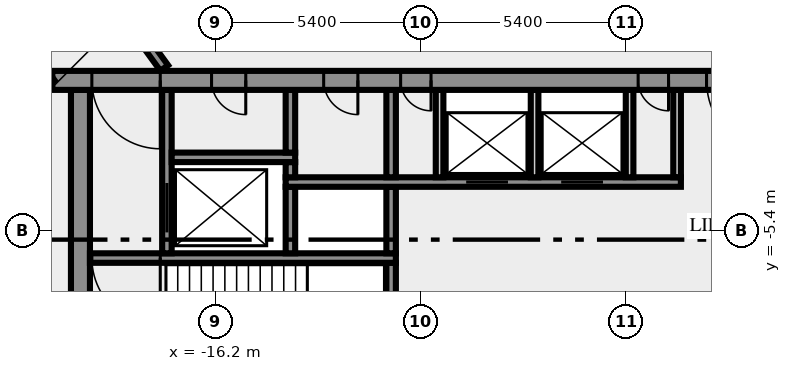
"""IFC4 building model, lengths in metres.
Left out: names, types, materials, properties, quantities, classifications, styles, units other than length and angle.
Written with IfcOpenShell. Run it as: python <this file> out.ifc"""

import sys

from ifc_helpers import new_model, si_unit, direction, frame, frame_2d, origin, place, context, subcontext, project, spatial, rectangle, extrude, element, fill, save


model = new_model("IFC4")
c1 = context("Model", 3, precision=1e-05, world=origin(), true_north=direction((0.0, 1.0)))
c2 = subcontext(c1, "Body", "Model", "MODEL_VIEW")
j1 = project(units=[si_unit("LENGTHUNIT", "METRE"), si_unit("PLANEANGLEUNIT", "RADIAN")], contexts=[c1])
p1 = place(None, origin())
s1 = spatial("IfcSite", under=j1, at=p1, CompositionType="ELEMENT")
p2 = place(p1, origin())
s2 = spatial("IfcBuilding", under=s1, at=p2, CompositionType="ELEMENT")
p3 = place(p2, frame((0.0, 0.0, 327.0)))
s3 = spatial("IfcBuildingStorey", under=s2, at=p3, CompositionType="ELEMENT", Elevation=327.0)
p4 = place(p3, frame((-19.75, -10.5, 0.0), z_axis=(0.0, 0.0, 1.0), x_axis=(0.0, 1.0, 0.0)))
e1 = element("IfcWall", 1, at=p4, inside=s3, PredefinedType="SHEAR", context=c2, shape_type="SweptSolid", body=[
    extrude(rectangle(XDim=8.8, YDim=0.5, at=frame_2d((4.4, 0.0))), origin(), (0.0, 0.0, 1.0), 3.65),
])
p5 = place(p3, frame((-11.575, -7.25, 0.0), z_axis=(0.0, 0.0, 1.0), x_axis=(0.0, 1.0, 0.0)))
e2 = element("IfcWall", 2, at=p5, inside=s3, PredefinedType="SHEAR", context=c2, shape_type="SweptSolid", body=[
    extrude(rectangle(XDim=1.0, YDim=0.25, at=frame_2d((0.5, 0.0))), origin(), (0.0, 0.0, 1.0), 3.65),
])
p6 = place(p3, frame((-11.45, -6.125, 0.0), z_axis=(0.0, 0.0, 1.0), x_axis=(-1.0, 0.0, 0.0)))
e3 = element("IfcWall", 3, at=p6, inside=s3, PredefinedType="SHEAR", context=c2, shape_type="SweptSolid", body=[
    extrude(rectangle(XDim=8.05, YDim=0.25, at=frame_2d((4.025, 0.0))), origin(), (0.0, 0.0, 1.0), 3.65),
])
p7 = place(p6, frame((6.2, 0.0, 0.0)))
e4 = element("IfcOpeningElement", 4, at=p7, cuts=e3, PredefinedType="OPENING", context=c2, shape_type="SweptSolid", body=[
    extrude(rectangle(XDim=1.8, YDim=2.1, at=frame_2d((0.9, 1.05))), frame((0.0, 0.135, 0.0), z_axis=(0.0, -1.0, 0.0), x_axis=(1.0, 0.0, 0.0)), (0.0, 0.0, 1.0), 0.27),
])
p8 = place(p3, frame((-17.475, -6.0, 0.0), z_axis=(0.0, 0.0, 1.0), x_axis=(0.0, 1.0, 0.0)))
e5 = element("IfcWall", 5, at=p8, inside=s3, PredefinedType="SHEAR", context=c2, shape_type="SweptSolid", body=[
    extrude(rectangle(XDim=4.3, YDim=0.25, at=frame_2d((2.15, 0.0))), origin(), (0.0, 0.0, 1.0), 3.65),
])
p9 = place(p8, frame((0.55, 0.0, 0.0)))
e6 = element("IfcOpeningElement", 6, at=p9, cuts=e5, PredefinedType="OPENING", context=c2, shape_type="SweptSolid", body=[
    extrude(rectangle(XDim=1.3, YDim=2.1, at=frame_2d((0.65, 1.05))), frame((0.0, 0.135, 0.0), z_axis=(0.0, -1.0, 0.0), x_axis=(1.0, 0.0, 0.0)), (0.0, 0.0, 1.0), 0.27),
])
for number, where, z_axis, x_axis in (
    (7, (-14.225, -6.0, 0.0), (0.0, 0.0, 1.0), (0.0, 1.0, 0.0)),
    (8, (-11.575, -6.0, 0.0), (0.0, 0.0, 1.0), (0.0, 1.0, 0.0)),
):
    element("IfcWall", number, at=place(p3, frame(where, z_axis=z_axis, x_axis=x_axis)), inside=s3, PredefinedType="SHEAR", context=c2, shape_type="SweptSolid", body=[
        extrude(rectangle(XDim=1.75, YDim=0.25, at=frame_2d((0.875, 0.0))), origin(), (0.0, 0.0, 1.0), 3.65),
    ])
p10 = place(p3, frame((-14.35, -4.125, 0.0), z_axis=(0.0, 0.0, 1.0), x_axis=(1.0, 0.0, 0.0)))
e9 = element("IfcWall", 9, at=p10, inside=s3, PredefinedType="SHEAR", context=c2, shape_type="SweptSolid", body=[
    extrude(rectangle(XDim=10.4, YDim=0.25, at=frame_2d((5.2, 0.0))), origin(), (0.0, 0.0, 1.0), 3.65),
])
p11 = place(p10, frame((4.75, 0.0, 0.0)))
e10 = element("IfcOpeningElement", 10, at=p11, cuts=e9, PredefinedType="OPENING", context=c2, shape_type="SweptSolid", body=[
    extrude(rectangle(XDim=1.1, YDim=2.1, at=frame_2d((0.55, 1.05))), frame((0.0, 0.135, 0.0), z_axis=(0.0, -1.0, 0.0), x_axis=(1.0, 0.0, 0.0)), (0.0, 0.0, 1.0), 0.27),
])
p12 = place(p10, frame((7.25, 0.0, 0.0)))
e11 = element("IfcOpeningElement", 11, at=p12, cuts=e9, PredefinedType="OPENING", context=c2, shape_type="SweptSolid", body=[
    extrude(rectangle(XDim=1.1, YDim=2.1, at=frame_2d((0.55, 1.05))), frame((0.0, 0.135, 0.0), z_axis=(0.0, -1.0, 0.0), x_axis=(1.0, 0.0, 0.0)), (0.0, 0.0, 1.0), 0.27),
])
p13 = place(p3, frame((-14.225, -4.0, 0.0), z_axis=(0.0, 0.0, 1.0), x_axis=(0.0, 1.0, 0.0)))
e12 = element("IfcWall", 12, at=p13, inside=s3, PredefinedType="SHEAR", context=c2, shape_type="SweptSolid", body=[
    extrude(rectangle(XDim=0.4, YDim=0.25, at=frame_2d((0.2, 0.0))), origin(), (0.0, 0.0, 1.0), 3.65),
])
p14 = place(p3, frame((-11.575, -4.0, 0.0), z_axis=(0.0, 0.0, 1.0), x_axis=(0.0, 1.0, 0.0)))
e13 = element("IfcWall", 13, at=p14, inside=s3, PredefinedType="SHEAR", context=c2, shape_type="SweptSolid", body=[
    extrude(rectangle(XDim=2.3, YDim=0.25, at=frame_2d((1.15, 0.0))), origin(), (0.0, 0.0, 1.0), 3.65),
])
for number, where, z_axis, x_axis in (
    (14, (-10.3, -4.0, 0.0), (0.0, 0.0, 1.0), (0.0, 1.0, 0.0)),
    (15, (-7.8, -4.0, 0.0), (0.0, 0.0, 1.0), (0.0, 1.0, 0.0)),
    (16, (-5.3, -4.0, 0.0), (0.0, 0.0, 1.0), (0.0, 1.0, 0.0)),
    (17, (-4.05, -4.0, 0.0), (0.0, 0.0, 1.0), (0.0, 1.0, 0.0)),
):
    element("IfcWall", number, at=place(p3, frame(where, z_axis=z_axis, x_axis=x_axis)), inside=s3, PredefinedType="SOLIDWALL", context=c2, shape_type="SweptSolid", body=[
        extrude(rectangle(XDim=2.3, YDim=0.2, at=frame_2d((1.15, 0.0))), origin(), (0.0, 0.0, 1.0), 3.65),
    ])
p15 = place(p3, frame((-17.35, -3.475, 0.0), z_axis=(0.0, 0.0, 1.0), x_axis=(1.0, 0.0, 0.0)))
e18 = element("IfcWall", 18, at=p15, inside=s3, PredefinedType="SHEAR", context=c2, shape_type="SweptSolid", body=[
    extrude(rectangle(XDim=3.25, YDim=0.25, at=frame_2d((1.625, 0.0))), origin(), (0.0, 0.0, 1.0), 3.65),
])
p16 = place(p3, frame((-14.225, -3.35, 0.0), z_axis=(0.0, 0.0, 1.0), x_axis=(0.0, 1.0, 0.0)))
e19 = element("IfcWall", 19, at=p16, inside=s3, PredefinedType="SHEAR", context=c2, shape_type="SweptSolid", body=[
    extrude(rectangle(XDim=1.65, YDim=0.25, at=frame_2d((0.825, 0.0))), origin(), (0.0, 0.0, 1.0), 3.65),
])
p17 = place(p3, frame((20.49, -1.45, 0.0), z_axis=(0.0, 0.0, 1.0), x_axis=(-1.0, 0.0, 0.0)))
e20 = element("IfcWall", 20, at=p17, inside=s3, PredefinedType="SHEAR", context=c2, shape_type="SweptSolid", body=[
    extrude(rectangle(XDim=40.98, YDim=0.5, at=frame_2d((20.49, 0.0))), origin(), (0.0, 0.0, 1.0), 3.65),
])
p18 = place(p17, frame((38.14, 0.0, 0.0)))
e21 = element("IfcOpeningElement", 21, at=p18, cuts=e20, PredefinedType="OPENING", context=c2, shape_type="SweptSolid", body=[
    extrude(rectangle(XDim=1.8, YDim=2.1, at=frame_2d((0.9, 1.05))), frame((0.0, 0.26, 0.0), z_axis=(0.0, -1.0, 0.0), x_axis=(1.0, 0.0, 0.0)), (0.0, 0.0, 1.0), 0.52),
])
p19 = place(p17, frame((35.89, 0.0, 0.0)))
e22 = element("IfcOpeningElement", 22, at=p19, cuts=e20, PredefinedType="OPENING", context=c2, shape_type="SweptSolid", body=[
    extrude(rectangle(XDim=0.9, YDim=2.1, at=frame_2d((0.45, 1.05))), frame((0.0, 0.26, 0.0), z_axis=(0.0, -1.0, 0.0), x_axis=(1.0, 0.0, 0.0)), (0.0, 0.0, 1.0), 0.52),
])
p20 = place(p17, frame((32.94, 0.0, 0.0)))
e23 = element("IfcOpeningElement", 23, at=p20, cuts=e20, PredefinedType="OPENING", context=c2, shape_type="SweptSolid", body=[
    extrude(rectangle(XDim=0.9, YDim=2.1, at=frame_2d((0.45, 1.05))), frame((0.0, 0.26, 0.0), z_axis=(0.0, -1.0, 0.0), x_axis=(1.0, 0.0, 0.0)), (0.0, 0.0, 1.0), 0.52),
])
p21 = place(p17, frame((31.015, 0.0, 0.0)))
e24 = element("IfcOpeningElement", 24, at=p21, cuts=e20, PredefinedType="OPENING", context=c2, shape_type="SweptSolid", body=[
    extrude(rectangle(XDim=0.8, YDim=2.1, at=frame_2d((0.4, 1.05))), frame((0.0, 0.26, 0.0), z_axis=(0.0, -1.0, 0.0), x_axis=(1.0, 0.0, 0.0)), (0.0, 0.0, 1.0), 0.52),
])
p22 = place(p17, frame((24.765, 0.0, 0.0)))
e25 = element("IfcOpeningElement", 25, at=p22, cuts=e20, PredefinedType="OPENING", context=c2, shape_type="SweptSolid", body=[
    extrude(rectangle(XDim=0.8, YDim=2.1, at=frame_2d((0.4, 1.05))), frame((0.0, 0.26, 0.0), z_axis=(0.0, -1.0, 0.0), x_axis=(1.0, 0.0, 0.0)), (0.0, 0.0, 1.0), 0.52),
])
p23 = place(p17, frame((21.765, 0.0, 0.0)))
e26 = element("IfcOpeningElement", 26, at=p23, cuts=e20, PredefinedType="OPENING", context=c2, shape_type="SweptSolid", body=[
    extrude(rectangle(XDim=2.0, YDim=2.1, at=frame_2d((1.0, 1.05))), frame((0.0, 0.26, 0.0), z_axis=(0.0, -1.0, 0.0), x_axis=(1.0, 0.0, 0.0)), (0.0, 0.0, 1.0), 0.52),
])
p24 = place(p17, frame((15.103, 0.0, 0.0)))
e27 = element("IfcOpeningElement", 27, at=p24, cuts=e20, PredefinedType="OPENING", context=c2, shape_type="SweptSolid", body=[
    extrude(rectangle(XDim=0.9, YDim=2.1, at=frame_2d((0.45, 1.05))), frame((0.0, 0.26, 0.0), z_axis=(0.0, -1.0, 0.0), x_axis=(1.0, 0.0, 0.0)), (0.0, 0.0, 1.0), 0.52),
])
p25 = place(p17, frame((13.04, 0.0, 0.0)))
e28 = element("IfcOpeningElement", 28, at=p25, cuts=e20, PredefinedType="OPENING", context=c2, shape_type="SweptSolid", body=[
    extrude(rectangle(XDim=0.9, YDim=2.1, at=frame_2d((0.45, 1.05))), frame((0.0, 0.26, 0.0), z_axis=(0.0, -1.0, 0.0), x_axis=(1.0, 0.0, 0.0)), (0.0, 0.0, 1.0), 0.52),
])
p26 = place(p17, frame((10.177, 0.0, 0.0)))
e29 = element("IfcOpeningElement", 29, at=p26, cuts=e20, PredefinedType="OPENING", context=c2, shape_type="SweptSolid", body=[
    extrude(rectangle(XDim=0.9, YDim=2.1, at=frame_2d((0.45, 1.05))), frame((0.0, 0.26, 0.0), z_axis=(0.0, -1.0, 0.0), x_axis=(1.0, 0.0, 0.0)), (0.0, 0.0, 1.0), 0.52),
])
p27 = place(p17, frame((7.14, 0.0, 0.0)))
e30 = element("IfcOpeningElement", 30, at=p27, cuts=e20, PredefinedType="OPENING", context=c2, shape_type="SweptSolid", body=[
    extrude(rectangle(XDim=0.9, YDim=2.1, at=frame_2d((0.45, 1.05))), frame((0.0, 0.26, 0.0), z_axis=(0.0, -1.0, 0.0), x_axis=(1.0, 0.0, 0.0)), (0.0, 0.0, 1.0), 0.52),
])
p28 = place(p17, frame((5.028, 0.0, 0.0)))
e31 = element("IfcOpeningElement", 31, at=p28, cuts=e20, PredefinedType="OPENING", context=c2, shape_type="SweptSolid", body=[
    extrude(rectangle(XDim=0.8, YDim=2.1, at=frame_2d((0.4, 1.05))), frame((0.0, 0.26, 0.0), z_axis=(0.0, -1.0, 0.0), x_axis=(1.0, 0.0, 0.0)), (0.0, 0.0, 1.0), 0.52),
])
p29 = place(p17, frame((3.452, 0.0, 0.0)))
e32 = element("IfcOpeningElement", 32, at=p29, cuts=e20, PredefinedType="OPENING", context=c2, shape_type="SweptSolid", body=[
    extrude(rectangle(XDim=0.8, YDim=2.1, at=frame_2d((0.4, 1.05))), frame((0.0, 0.26, 0.0), z_axis=(0.0, -1.0, 0.0), x_axis=(1.0, 0.0, 0.0)), (0.0, 0.0, 1.0), 0.52),
])
p30 = place(p17, frame((1.04, 0.0, 0.0)))
e33 = element("IfcOpeningElement", 33, at=p30, cuts=e20, PredefinedType="OPENING", context=c2, shape_type="SweptSolid", body=[
    extrude(rectangle(XDim=1.8, YDim=2.1, at=frame_2d((0.9, 1.05))), frame((0.0, 0.26, 0.0), z_axis=(0.0, -1.0, 0.0), x_axis=(1.0, 0.0, 0.0)), (0.0, 0.0, 1.0), 0.52),
])
p31 = place(p3, frame((-20.531, -1.523, 0.0), z_axis=(0.0, 0.0, 1.0), x_axis=(-0.587782646447, 0.809018887626, 0.0)))
e34 = element("IfcWall", 34, at=p31, inside=s3, PredefinedType="SOLIDWALL", context=c2, shape_type="SweptSolid", body=[
    extrude(rectangle(XDim=11.27, YDim=0.25, at=frame_2d((5.635, 0.0))), origin(), (0.0, 0.0, 1.0), 3.65),
])
p32 = place(p31, frame((7.566, 0.0, 0.0)))
e35 = element("IfcOpeningElement", 35, at=p32, cuts=e34, PredefinedType="OPENING", context=c2, shape_type="SweptSolid", body=[
    extrude(rectangle(XDim=0.9, YDim=2.1, at=frame_2d((0.45, 1.05))), frame((0.0, 0.135, 0.0), z_axis=(0.0, -1.0, 0.0), x_axis=(1.0, 0.0, 0.0)), (0.0, 0.0, 1.0), 0.27),
])
p33 = place(p31, frame((9.165, 0.0, 0.0)))
e36 = element("IfcOpeningElement", 36, at=p33, cuts=e34, PredefinedType="OPENING", context=c2, shape_type="SweptSolid", body=[
    extrude(rectangle(XDim=0.9, YDim=2.1, at=frame_2d((0.45, 1.05))), frame((0.0, 0.135, 0.0), z_axis=(0.0, -1.0, 0.0), x_axis=(1.0, 0.0, 0.0)), (0.0, 0.0, 1.0), 0.27),
])
p34 = place(p3, frame((-24.865, 8.95, 0.0), z_axis=(0.0, 0.0, 1.0), x_axis=(0.587791617212, -0.809012369952, 0.0)))
e37 = element("IfcWall", 37, at=p34, inside=s3, PredefinedType="SOLIDWALL", context=c2, shape_type="SweptSolid", body=[
    extrude(rectangle(XDim=12.453, YDim=0.25, at=frame_2d((6.227, 0.0))), origin(), (0.0, 0.0, 1.0), 3.65),
])
p35 = place(p34, frame((8.112, 0.0, 0.0)))
e38 = element("IfcOpeningElement", 38, at=p35, cuts=e37, PredefinedType="OPENING", context=c2, shape_type="SweptSolid", body=[
    extrude(rectangle(XDim=0.9, YDim=2.1, at=frame_2d((0.45, 1.05))), frame((0.0, 0.135, 0.0), z_axis=(0.0, -1.0, 0.0), x_axis=(1.0, 0.0, 0.0)), (0.0, 0.0, 1.0), 0.27),
])
p36 = place(p7, origin())
e39 = element("IfcDoor", 39, at=p36, inside=s3, OperationType="DOUBLE_DOOR_SINGLE_SWING", PredefinedType="DOOR", context=c2, shape_type="SweptSolid", body=[
    extrude(rectangle(XDim=1.8, YDim=2.1, at=frame_2d((0.9, 1.05))), frame((0.0, 0.025, 0.0), z_axis=(0.0, -1.0, 0.0), x_axis=(1.0, 0.0, 0.0)), (0.0, 0.0, 1.0), 0.05),
])
fill(e4, e39)
p37 = place(p9, origin())
e40 = element("IfcDoor", 40, at=p37, inside=s3, OperationType="DOUBLE_DOOR_SLIDING", PredefinedType="DOOR", context=c2, shape_type="SweptSolid", body=[
    extrude(rectangle(XDim=1.3, YDim=2.1, at=frame_2d((0.65, 1.05))), frame((0.0, 0.025, 0.0), z_axis=(0.0, -1.0, 0.0), x_axis=(1.0, 0.0, 0.0)), (0.0, 0.0, 1.0), 0.05),
])
fill(e6, e40)
p38 = place(p11, origin())
e41 = element("IfcDoor", 41, at=p38, inside=s3, OperationType="DOUBLE_DOOR_SLIDING", PredefinedType="DOOR", context=c2, shape_type="SweptSolid", body=[
    extrude(rectangle(XDim=1.1, YDim=2.1, at=frame_2d((0.55, 1.05))), frame((0.0, 0.025, 0.0), z_axis=(0.0, -1.0, 0.0), x_axis=(1.0, 0.0, 0.0)), (0.0, 0.0, 1.0), 0.05),
])
fill(e10, e41)
p39 = place(p12, origin())
e42 = element("IfcDoor", 42, at=p39, inside=s3, OperationType="DOUBLE_DOOR_SLIDING", PredefinedType="DOOR", context=c2, shape_type="SweptSolid", body=[
    extrude(rectangle(XDim=1.1, YDim=2.1, at=frame_2d((0.55, 1.05))), frame((0.0, 0.025, 0.0), z_axis=(0.0, -1.0, 0.0), x_axis=(1.0, 0.0, 0.0)), (0.0, 0.0, 1.0), 0.05),
])
fill(e11, e42)
p40 = place(p18, origin())
e43 = element("IfcDoor", 43, at=p40, inside=s3, OperationType="DOUBLE_DOOR_SINGLE_SWING", PredefinedType="DOOR", context=c2, shape_type="SweptSolid", body=[
    extrude(rectangle(XDim=1.8, YDim=2.1, at=frame_2d((0.9, 1.05))), frame((0.0, 0.025, 0.0), z_axis=(0.0, -1.0, 0.0), x_axis=(1.0, 0.0, 0.0)), (0.0, 0.0, 1.0), 0.05),
])
fill(e21, e43)
p41 = place(p19, origin())
e44 = element("IfcDoor", 44, at=p41, inside=s3, OperationType="SINGLE_SWING_RIGHT", PredefinedType="DOOR", context=c2, shape_type="SweptSolid", body=[
    extrude(rectangle(XDim=0.9, YDim=2.1, at=frame_2d((0.45, 1.05))), frame((0.0, 0.025, 0.0), z_axis=(0.0, -1.0, 0.0), x_axis=(1.0, 0.0, 0.0)), (0.0, 0.0, 1.0), 0.05),
])
fill(e22, e44)
p42 = place(p20, origin())
e45 = element("IfcDoor", 45, at=p42, inside=s3, OperationType="SINGLE_SWING_RIGHT", PredefinedType="DOOR", context=c2, shape_type="SweptSolid", body=[
    extrude(rectangle(XDim=0.9, YDim=2.1, at=frame_2d((0.45, 1.05))), frame((0.0, 0.025, 0.0), z_axis=(0.0, -1.0, 0.0), x_axis=(1.0, 0.0, 0.0)), (0.0, 0.0, 1.0), 0.05),
])
fill(e23, e45)
p43 = place(p21, origin())
e46 = element("IfcDoor", 46, at=p43, inside=s3, OperationType="SINGLE_SWING_RIGHT", PredefinedType="DOOR", context=c2, shape_type="SweptSolid", body=[
    extrude(rectangle(XDim=0.8, YDim=2.1, at=frame_2d((0.4, 1.05))), frame((0.0, 0.025, 0.0), z_axis=(0.0, -1.0, 0.0), x_axis=(1.0, 0.0, 0.0)), (0.0, 0.0, 1.0), 0.05),
])
fill(e24, e46)
p44 = place(p22, origin())
e47 = element("IfcDoor", 47, at=p44, inside=s3, OperationType="SINGLE_SWING_RIGHT", PredefinedType="DOOR", context=c2, shape_type="SweptSolid", body=[
    extrude(rectangle(XDim=0.8, YDim=2.1, at=frame_2d((0.4, 1.05))), frame((0.0, 0.025, 0.0), z_axis=(0.0, -1.0, 0.0), x_axis=(1.0, 0.0, 0.0)), (0.0, 0.0, 1.0), 0.05),
])
fill(e25, e47)
p45 = place(p23, origin())
e48 = element("IfcDoor", 48, at=p45, inside=s3, OperationType="DOUBLE_DOOR_SINGLE_SWING", PredefinedType="DOOR", context=c2, shape_type="SweptSolid", body=[
    extrude(rectangle(XDim=2.0, YDim=2.1, at=frame_2d((1.0, 1.05))), frame((0.0, 0.025, 0.0), z_axis=(0.0, -1.0, 0.0), x_axis=(1.0, 0.0, 0.0)), (0.0, 0.0, 1.0), 0.05),
])
fill(e26, e48)
save(model, sys.argv[1])
